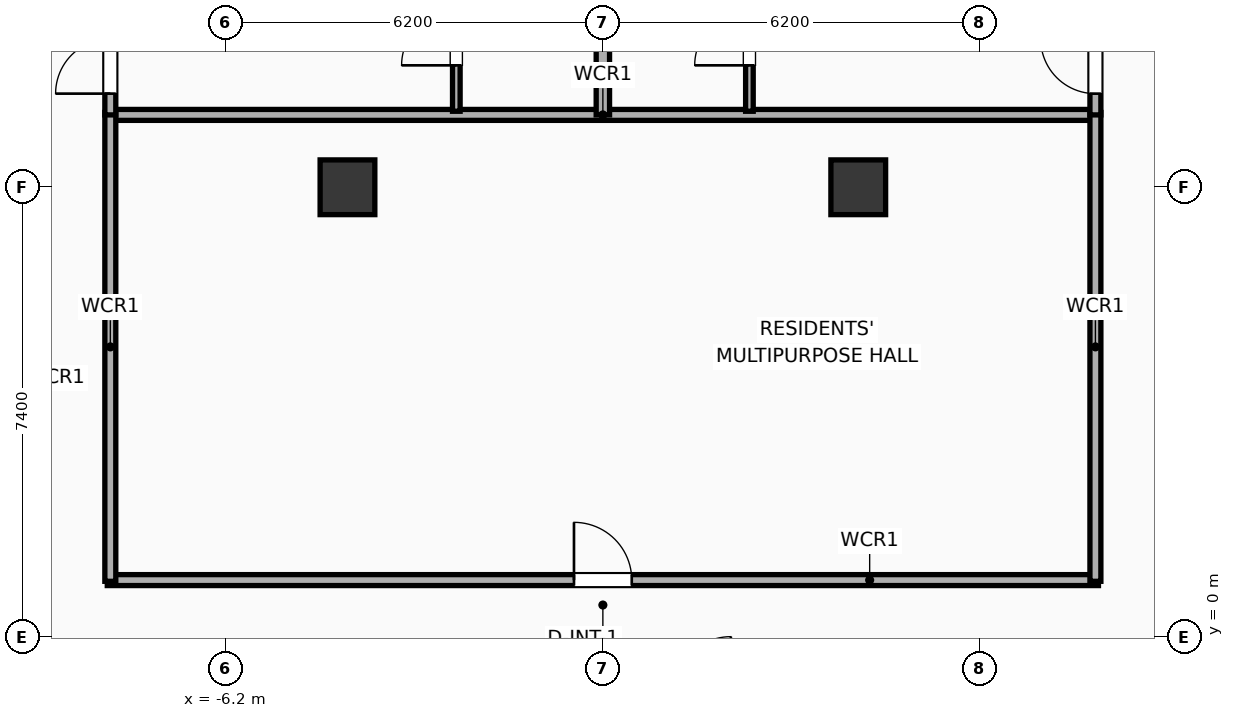
"""IFC4 building model, lengths in metres.
Left out: names, types, materials, properties, quantities, classifications, styles, units other than length and angle.
Written with IfcOpenShell. Run it as: python <this file> out.ifc"""

import sys

from ifc_helpers import new_model, si_unit, direction, frame, frame_2d, origin, origin_2d, place, context, subcontext, project, spatial, rectangle, extrude, element, fill, save


model = new_model("IFC4")
c1 = context("Model", 3, precision=1e-05, world=origin(), true_north=direction((0.0, 1.0)))
c2 = subcontext(c1, "Body", "Model", "MODEL_VIEW")
j1 = project(units=[si_unit("LENGTHUNIT", "METRE"), si_unit("PLANEANGLEUNIT", "RADIAN")], contexts=[c1])
p1 = place(None, origin())
s1 = spatial("IfcSite", under=j1, at=p1, CompositionType="ELEMENT")
p2 = place(p1, origin())
s2 = spatial("IfcBuilding", under=s1, at=p2, CompositionType="ELEMENT")
p3 = place(p2, frame((0.0, 0.0, 191.1)))
s3 = spatial("IfcBuildingStorey", under=s2, at=p3, CompositionType="ELEMENT", Elevation=191.1)
for number, where, z_axis, x_axis in (
    (1, (-4.2, 7.4, 0.0), (0.0, 0.0, 1.0), (1.0, 0.0, 0.0)),
    (2, (4.2, 7.4, 0.0), (0.0, 0.0, 1.0), (1.0, 0.0, 0.0)),
):
    element("IfcColumn", number, at=place(p3, frame(where, z_axis=z_axis, x_axis=x_axis)), inside=s3, PredefinedType="COLUMN", context=c2, shape_type="SweptSolid", body=[
        extrude(rectangle(XDim=0.9, YDim=0.9, at=origin_2d()), origin(), (0.0, 0.0, 1.0), 3.9),
    ])
p4 = place(p3, frame((-8.15, 8.59, 0.0), z_axis=(0.0, 0.0, 1.0), x_axis=(1.0, 0.0, 0.0)))
e3 = element("IfcWall", 3, at=p4, inside=s3, PredefinedType="PARTITIONING", context=c2, shape_type="SweptSolid", body=[
    extrude(rectangle(XDim=16.3, YDim=0.18, at=frame_2d((8.15, 0.0))), origin(), (0.0, 0.0, 1.0), 3.5),
])
p5 = place(p3, frame((-8.15, 0.94, 0.0), z_axis=(0.0, 0.0, 1.0), x_axis=(1.0, 0.0, 0.0)))
e4 = element("IfcWall", 4, at=p5, inside=s3, PredefinedType="PARTITIONING", context=c2, shape_type="SweptSolid", body=[
    extrude(rectangle(XDim=16.3, YDim=0.18, at=frame_2d((8.15, 0.0))), origin(), (0.0, 0.0, 1.0), 3.5),
])
p6 = place(p5, frame((7.675, 0.0, 0.0)))
e5 = element("IfcOpeningElement", 5, at=p6, cuts=e4, PredefinedType="OPENING", context=c2, shape_type="SweptSolid", body=[
    extrude(rectangle(XDim=0.95, YDim=2.05, at=frame_2d((0.475, 1.025))), frame((0.0, 0.1, 0.0), z_axis=(0.0, -1.0, 0.0), x_axis=(1.0, 0.0, 0.0)), (0.0, 0.0, 1.0), 0.2),
])
for number, where, z_axis, x_axis in (
    (6, (-8.1, 0.92, 0.0), (0.0, 0.0, 1.0), (0.0, 1.0, 0.0)),
    (7, (8.1, 0.92, 0.0), (0.0, 0.0, 1.0), (0.0, 1.0, 0.0)),
):
    element("IfcWall", number, at=place(p3, frame(where, z_axis=z_axis, x_axis=x_axis)), inside=s3, PredefinedType="PARTITIONING", context=c2, shape_type="SweptSolid", body=[
        extrude(rectangle(XDim=7.71, YDim=0.18, at=frame_2d((3.855, 0.0))), origin(), (0.0, 0.0, 1.0), 3.5),
    ])
p7 = place(p3, frame((-2.41, 8.65, 0.0), z_axis=(0.0, 0.0, 1.0), x_axis=(0.0, 1.0, 0.0)))
e8 = element("IfcWall", 8, at=p7, inside=s3, PredefinedType="PARTITIONING", context=c2, shape_type="SweptSolid", body=[
    extrude(rectangle(XDim=2.41, YDim=0.125, at=frame_2d((1.205, 0.0))), origin(), (0.0, 0.0, 1.0), 2.39),
])
p8 = place(p7, frame((0.755, 0.0, 0.0)))
e9 = element("IfcOpeningElement", 9, at=p8, cuts=e8, PredefinedType="OPENING", context=c2, shape_type="SweptSolid", body=[
    extrude(rectangle(XDim=0.9, YDim=2.05, at=frame_2d((0.45, 1.025))), frame((0.0, 0.073, 0.0), z_axis=(0.0, -1.0, 0.0), x_axis=(1.0, 0.0, 0.0)), (0.0, 0.0, 1.0), 0.145),
])
p9 = place(p3, frame((-8.1, 8.59, 0.0), z_axis=(0.0, 0.0, 1.0), x_axis=(0.0, 1.0, 0.0)))
e10 = element("IfcWall", 10, at=p9, inside=s3, PredefinedType="PARTITIONING", context=c2, shape_type="SweptSolid", body=[
    extrude(rectangle(XDim=10.636, YDim=0.18, at=frame_2d((5.318, 0.0))), origin(), (0.0, 0.0, 1.0), 3.5),
])
p10 = place(p9, frame((0.35, 0.0, 0.0)))
e11 = element("IfcOpeningElement", 11, at=p10, cuts=e10, PredefinedType="OPENING", context=c2, shape_type="SweptSolid", body=[
    extrude(rectangle(XDim=0.9, YDim=2.05, at=frame_2d((0.45, 1.025))), frame((0.0, 0.1, 0.0), z_axis=(0.0, -1.0, 0.0), x_axis=(1.0, 0.0, 0.0)), (0.0, 0.0, 1.0), 0.2),
])
p11 = place(p3, frame((2.41, 8.65, 0.0), z_axis=(0.0, 0.0, 1.0), x_axis=(0.0, 1.0, 0.0)))
e12 = element("IfcWall", 12, at=p11, inside=s3, PredefinedType="PARTITIONING", context=c2, shape_type="SweptSolid", body=[
    extrude(rectangle(XDim=2.41, YDim=0.125, at=frame_2d((1.205, 0.0))), origin(), (0.0, 0.0, 1.0), 3.5),
])
p12 = place(p11, frame((0.755, 0.0, 0.0)))
e13 = element("IfcOpeningElement", 13, at=p12, cuts=e12, PredefinedType="OPENING", context=c2, shape_type="SweptSolid", body=[
    extrude(rectangle(XDim=0.9, YDim=2.05, at=frame_2d((0.45, 1.025))), frame((0.0, 0.073, 0.0), z_axis=(0.0, -1.0, 0.0), x_axis=(1.0, 0.0, 0.0)), (0.0, 0.0, 1.0), 0.145),
])
p13 = place(p3, frame((8.1, 8.59, 0.0), z_axis=(0.0, 0.0, 1.0), x_axis=(0.0, 1.0, 0.0)))
e14 = element("IfcWall", 14, at=p13, inside=s3, PredefinedType="PARTITIONING", context=c2, shape_type="SweptSolid", body=[
    extrude(rectangle(XDim=12.339, YDim=0.18, at=frame_2d((6.169, 0.0))), origin(), (0.0, 0.0, 1.0), 3.5),
])
p14 = place(p13, frame((0.35, 0.0, 0.0)))
e15 = element("IfcOpeningElement", 15, at=p14, cuts=e14, PredefinedType="OPENING", context=c2, shape_type="SweptSolid", body=[
    extrude(rectangle(XDim=0.9, YDim=2.05, at=frame_2d((0.45, 1.025))), frame((0.0, 0.1, 0.0), z_axis=(0.0, -1.0, 0.0), x_axis=(1.0, 0.0, 0.0)), (0.0, 0.0, 1.0), 0.2),
])
p15 = place(p3, frame((0.0, 8.59, 0.0), z_axis=(0.0, 0.0, 1.0), x_axis=(0.0, 1.0, 0.0)))
e16 = element("IfcWall", 16, at=p15, inside=s3, PredefinedType="PARTITIONING", context=c2, shape_type="SweptSolid", body=[
    extrude(rectangle(XDim=11.488, YDim=0.22, at=frame_2d((5.744, 0.0))), origin(), (0.0, 0.0, 1.0), 2.39),
])
p16 = place(p6, origin())
e17 = element("IfcDoor", 17, at=p16, inside=s3, OperationType="SINGLE_SWING_LEFT", PredefinedType="DOOR", context=c2, shape_type="SweptSolid", body=[
    extrude(rectangle(XDim=0.95, YDim=2.05, at=frame_2d((0.475, 1.025))), frame((0.0, 0.025, 0.0), z_axis=(0.0, -1.0, 0.0), x_axis=(1.0, 0.0, 0.0)), (0.0, 0.0, 1.0), 0.05),
])
fill(e5, e17)
p17 = place(p8, origin())
e18 = element("IfcDoor", 18, at=p17, inside=s3, OperationType="SINGLE_SWING_LEFT", PredefinedType="DOOR", context=c2, shape_type="SweptSolid", body=[
    extrude(rectangle(XDim=0.9, YDim=2.05, at=frame_2d((0.45, 1.025))), frame((0.0, 0.025, 0.0), z_axis=(0.0, -1.0, 0.0), x_axis=(1.0, 0.0, 0.0)), (0.0, 0.0, 1.0), 0.05),
])
fill(e9, e18)
p18 = place(p10, origin())
e19 = element("IfcDoor", 19, at=p18, inside=s3, OperationType="SINGLE_SWING_LEFT", PredefinedType="DOOR", context=c2, shape_type="SweptSolid", body=[
    extrude(rectangle(XDim=0.9, YDim=2.05, at=frame_2d((0.45, 1.025))), frame((0.0, 0.025, 0.0), z_axis=(0.0, -1.0, 0.0), x_axis=(1.0, 0.0, 0.0)), (0.0, 0.0, 1.0), 0.05),
])
fill(e11, e19)
p19 = place(p12, origin())
e20 = element("IfcDoor", 20, at=p19, inside=s3, OperationType="SINGLE_SWING_LEFT", PredefinedType="DOOR", context=c2, shape_type="SweptSolid", body=[
    extrude(rectangle(XDim=0.9, YDim=2.05, at=frame_2d((0.45, 1.025))), frame((0.0, 0.025, 0.0), z_axis=(0.0, -1.0, 0.0), x_axis=(1.0, 0.0, 0.0)), (0.0, 0.0, 1.0), 0.05),
])
fill(e13, e20)
p20 = place(p14, origin())
e21 = element("IfcDoor", 21, at=p20, inside=s3, OperationType="SINGLE_SWING_RIGHT", PredefinedType="DOOR", context=c2, shape_type="SweptSolid", body=[
    extrude(rectangle(XDim=0.9, YDim=2.05, at=frame_2d((0.45, 1.025))), frame((0.0, 0.025, 0.0), z_axis=(0.0, -1.0, 0.0), x_axis=(1.0, 0.0, 0.0)), (0.0, 0.0, 1.0), 0.05),
])
fill(e15, e21)
save(model, sys.argv[1])
